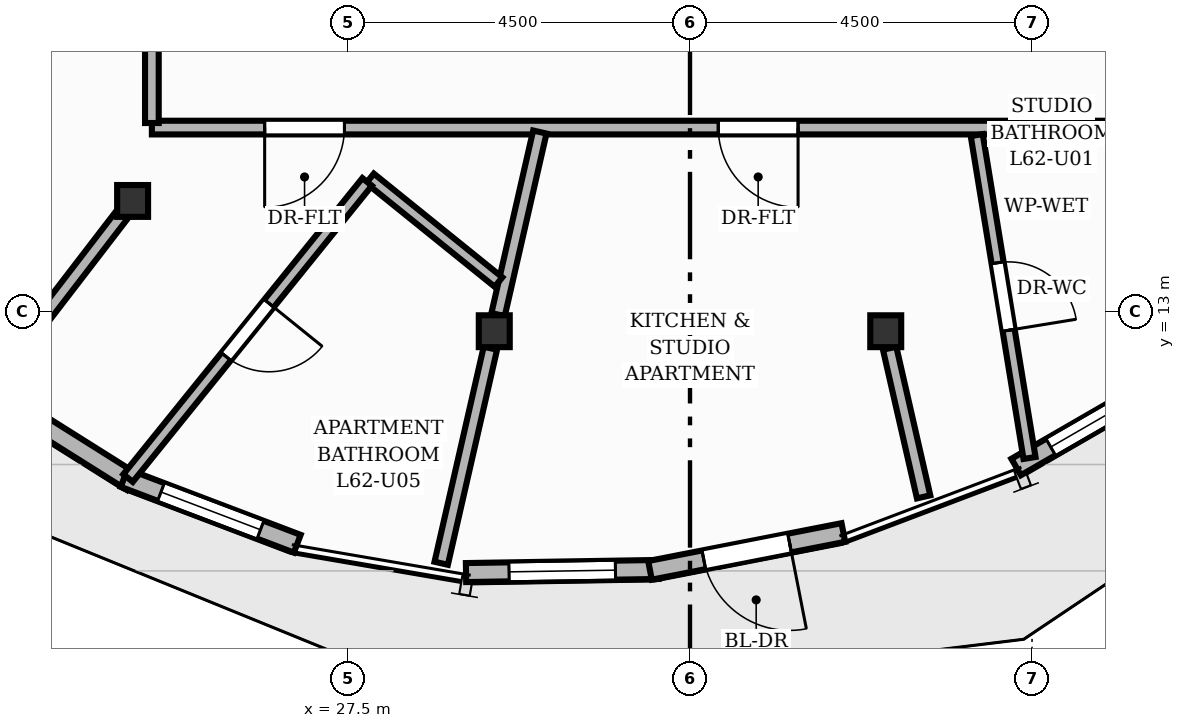
"""IFC4 building model, lengths in metres.
Left out: names, types, materials, properties, quantities, classifications, styles, units other than length and angle.
Written with IfcOpenShell. Run it as: python <this file> out.ifc"""

import sys

from ifc_helpers import new_model, si_unit, direction, frame, frame_2d, origin, origin_2d, place, context, subcontext, project, spatial, rectangle, i_section, extrude, element, fill, save


model = new_model("IFC4")
c1 = context("Model", 3, precision=1e-05, world=origin(), true_north=direction((0.0, 1.0)))
c2 = subcontext(c1, "Body", "Model", "MODEL_VIEW")
j1 = project(units=[si_unit("LENGTHUNIT", "METRE"), si_unit("PLANEANGLEUNIT", "RADIAN")], contexts=[c1])
p1 = place(None, origin())
s1 = spatial("IfcSite", under=j1, at=p1, CompositionType="ELEMENT")
p2 = place(p1, origin())
s2 = spatial("IfcBuilding", under=s1, at=p2, CompositionType="ELEMENT")
p3 = place(p2, frame((0.0, 0.0, 207.84)))
s3 = spatial("IfcBuildingStorey", under=s2, at=p3, CompositionType="ELEMENT", Elevation=207.84)
for number, where, z_axis, x_axis in (
    (1, (24.667, 14.455, 0.0), (0.0, 0.0, 1.0), (1.0, 0.0, 0.0)),
    (2, (29.425, 12.74, 0.0), (0.0, 0.0, 1.0), (1.0, 0.0, 0.0)),
    (3, (34.575, 12.74, 0.0), (0.0, 0.0, 1.0), (1.0, 0.0, 0.0)),
):
    element("IfcColumn", number, at=place(p3, frame(where, z_axis=z_axis, x_axis=x_axis)), inside=s3, PredefinedType="COLUMN", context=c2, shape_type="SweptSolid", body=[
        extrude(i_section(OverallWidth=0.407, OverallDepth=0.419, WebThickness=0.031, FlangeThickness=0.049, at=origin_2d()), origin(), (0.0, 0.0, 1.0), 3.2),
    ])
p4 = place(p3, frame((24.657, 10.758, 0.0), z_axis=(0.0, 0.0, 1.0), x_axis=(-0.846426943671, 0.532504862914, 0.0)))
e4 = element("IfcWall", 4, at=p4, inside=s3, PredefinedType="SOLIDWALL", context=c2, shape_type="SweptSolid", body=[
    extrude(rectangle(XDim=2.415, YDim=0.25, at=frame_2d((1.208, 0.0))), origin(), (0.0, 0.0, 1.0), 2.96),
])
p5 = place(p3, frame((26.833, 9.945, 0.0), z_axis=(0.0, 0.0, 1.0), x_axis=(-0.934909280934, 0.354886793813, 0.0)))
e5 = element("IfcWall", 5, at=p5, inside=s3, PredefinedType="SOLIDWALL", context=c2, shape_type="SweptSolid", body=[
    extrude(rectangle(XDim=2.437, YDim=0.25, at=frame_2d((1.218, 0.0))), origin(), (0.0, 0.0, 1.0), 2.96),
])
p6 = place(p5, frame((0.518, 0.0, 0.85)))
e6 = element("IfcOpeningElement", 6, at=p6, cuts=e5, PredefinedType="OPENING", context=c2, shape_type="SweptSolid", body=[
    extrude(rectangle(XDim=1.4, YDim=1.55, at=frame_2d((0.7, 0.775))), frame((0.0, 0.135, 0.0), z_axis=(0.0, -1.0, 0.0), x_axis=(1.0, 0.0, 0.0)), (0.0, 0.0, 1.0), 0.27),
])
p7 = place(p3, frame((31.585, 9.606, 0.0), z_axis=(0.0, 0.0, 1.0), x_axis=(-0.999868796453, -0.016198453019, 0.0)))
e7 = element("IfcWall", 7, at=p7, inside=s3, PredefinedType="SOLIDWALL", context=c2, shape_type="SweptSolid", body=[
    extrude(rectangle(XDim=2.532, YDim=0.25, at=frame_2d((1.266, 0.0))), origin(), (0.0, 0.0, 1.0), 2.96),
])
p8 = place(p7, frame((0.566, 0.0, 0.85)))
e8 = element("IfcOpeningElement", 8, at=p8, cuts=e7, PredefinedType="OPENING", context=c2, shape_type="SweptSolid", body=[
    extrude(rectangle(XDim=1.4, YDim=1.55, at=frame_2d((0.7, 0.775))), frame((0.0, 0.135, 0.0), z_axis=(0.0, -1.0, 0.0), x_axis=(1.0, 0.0, 0.0)), (0.0, 0.0, 1.0), 0.27),
])
p9 = place(p3, frame((34.018, 10.092, 0.0), z_axis=(0.0, 0.0, 1.0), x_axis=(-0.981387252987, -0.1920392139, 0.0)))
e9 = element("IfcWall", 9, at=p9, inside=s3, PredefinedType="SOLIDWALL", context=c2, shape_type="SweptSolid", body=[
    extrude(rectangle(XDim=2.592, YDim=0.25, at=frame_2d((1.296, 0.0))), origin(), (0.0, 0.0, 1.0), 2.96),
])
p10 = place(p9, frame((0.721, 0.0, 0.0)))
e10 = element("IfcOpeningElement", 10, at=p10, cuts=e9, PredefinedType="OPENING", context=c2, shape_type="SweptSolid", body=[
    extrude(rectangle(XDim=1.15, YDim=2.2, at=frame_2d((0.575, 1.1))), frame((0.0, 0.135, 0.0), z_axis=(0.0, -1.0, 0.0), x_axis=(1.0, 0.0, 0.0)), (0.0, 0.0, 1.0), 0.27),
])
p11 = place(p3, frame((38.63, 12.305, 0.0), z_axis=(0.0, 0.0, 1.0), x_axis=(-0.865914653104, -0.500191776762, 0.0)))
e11 = element("IfcWall", 11, at=p11, inside=s3, PredefinedType="SOLIDWALL", context=c2, shape_type="SweptSolid", body=[
    extrude(rectangle(XDim=2.702, YDim=0.25, at=frame_2d((1.351, 0.0))), origin(), (0.0, 0.0, 1.0), 2.96),
])
p12 = place(p11, frame((0.526, 0.0, 0.85)))
e12 = element("IfcOpeningElement", 12, at=p12, cuts=e11, PredefinedType="OPENING", context=c2, shape_type="SweptSolid", body=[
    extrude(rectangle(XDim=1.65, YDim=1.55, at=frame_2d((0.825, 0.775))), frame((0.0, 0.135, 0.0), z_axis=(0.0, -1.0, 0.0), x_axis=(1.0, 0.0, 0.0)), (0.0, 0.0, 1.0), 0.27),
])
p13 = place(p3, frame((24.527, 14.273, 0.0), z_axis=(0.0, 0.0, 1.0), x_axis=(-0.609211911664, -0.793007469502, 0.0)))
e13 = element("IfcWall", 13, at=p13, inside=s3, PredefinedType="PARTITIONING", context=c2, shape_type="SweptSolid", body=[
    extrude(rectangle(XDim=2.863, YDim=0.18, at=frame_2d((1.431, 0.0))), origin(), (0.0, 0.0, 1.0), 2.403),
])
p14 = place(p3, frame((29.374, 12.517, 0.0), z_axis=(0.0, 0.0, 1.0), x_axis=(-0.22289331625, -0.974842843525, 0.0)))
e14 = element("IfcWall", 14, at=p14, inside=s3, PredefinedType="PARTITIONING", context=c2, shape_type="SweptSolid", body=[
    extrude(rectangle(XDim=2.903, YDim=0.18, at=frame_2d((1.451, 0.0))), origin(), (0.0, 0.0, 1.0), 2.403),
])
p15 = place(p3, frame((34.626, 12.517, 0.0), z_axis=(0.0, 0.0, 1.0), x_axis=(0.222930532859, -0.974834333371, 0.0)))
e15 = element("IfcWall", 15, at=p15, inside=s3, PredefinedType="PARTITIONING", context=c2, shape_type="SweptSolid", body=[
    extrude(rectangle(XDim=2.006, YDim=0.18, at=frame_2d((1.003, 0.0))), origin(), (0.0, 0.0, 1.0), 2.403),
])
p16 = place(p3, frame((39.08, 15.42, 0.0), z_axis=(0.0, 0.0, 1.0), x_axis=(-1.0, 0.0, 0.0)))
e16 = element("IfcWall", 16, at=p16, inside=s3, PredefinedType="PARTITIONING", context=c2, shape_type="SweptSolid", body=[
    extrude(rectangle(XDim=14.16, YDim=0.18, at=frame_2d((7.08, 0.0))), origin(), (0.0, 0.0, 1.0), 2.955),
])
p17 = place(p16, frame((5.658, 0.0, 0.0)))
e17 = element("IfcOpeningElement", 17, at=p17, cuts=e16, PredefinedType="OPENING", context=c2, shape_type="SweptSolid", body=[
    extrude(rectangle(XDim=1.05, YDim=2.15, at=frame_2d((0.525, 1.075))), frame((0.0, 0.1, 0.0), z_axis=(0.0, -1.0, 0.0), x_axis=(1.0, 0.0, 0.0)), (0.0, 0.0, 1.0), 0.2),
])
p18 = place(p16, frame((11.626, 0.0, 0.0)))
e18 = element("IfcOpeningElement", 18, at=p18, cuts=e16, PredefinedType="OPENING", context=c2, shape_type="SweptSolid", body=[
    extrude(rectangle(XDim=1.05, YDim=2.15, at=frame_2d((0.525, 1.075))), frame((0.0, 0.1, 0.0), z_axis=(0.0, -1.0, 0.0), x_axis=(1.0, 0.0, 0.0)), (0.0, 0.0, 1.0), 0.2),
])
p19 = place(p3, frame((24.92, 15.48, 0.0), z_axis=(0.0, 0.0, 1.0), x_axis=(0.0, 1.0, 0.0)))
e19 = element("IfcWall", 19, at=p19, inside=s3, PredefinedType="PARTITIONING", context=c2, shape_type="SweptSolid", body=[
    extrude(rectangle(XDim=5.136, YDim=0.18, at=frame_2d((2.568, 0.0))), origin(), (0.0, 0.0, 1.0), 2.955),
])
p20 = place(p3, frame((35.772, 15.321, 0.0), z_axis=(0.0, 0.0, 1.0), x_axis=(0.16134496112, -0.986898071495, 0.0)))
e20 = element("IfcWall", 20, at=p20, inside=s3, PredefinedType="PLUMBINGWALL", context=c2, shape_type="SweptSolid", body=[
    extrude(rectangle(XDim=4.305, YDim=0.16, at=frame_2d((2.152, 0.0))), origin(), (0.0, 0.0, 1.0), 2.692),
])
p21 = place(p20, frame((1.702, 0.0, 0.0)))
e21 = element("IfcOpeningElement", 21, at=p21, cuts=e20, PredefinedType="OPENING", context=c2, shape_type="SweptSolid", body=[
    extrude(rectangle(XDim=0.9, YDim=2.1, at=frame_2d((0.45, 1.05))), frame((0.0, 0.09, 0.0), z_axis=(0.0, -1.0, 0.0), x_axis=(1.0, 0.0, 0.0)), (0.0, 0.0, 1.0), 0.18),
])
p22 = place(p3, frame((29.475, 12.959, 0.0), z_axis=(0.0, 0.0, 1.0), x_axis=(0.222927030412, 0.974835134323, 0.0)))
e22 = element("IfcWall", 22, at=p22, inside=s3, PredefinedType="PARTITIONING", context=c2, shape_type="SweptSolid", body=[
    extrude(rectangle(XDim=2.464, YDim=0.18, at=frame_2d((1.232, 0.0))), origin(), (0.0, 0.0, 1.0), 2.403),
])
p23 = place(p3, frame((29.48, 13.387, 0.0), z_axis=(0.0, 0.0, 1.0), x_axis=(-0.778120709533, 0.628114767695, 0.0)))
e23 = element("IfcWall", 23, at=p23, inside=s3, PredefinedType="PLUMBINGWALL", context=c2, shape_type="SweptSolid", body=[
    extrude(rectangle(XDim=2.173, YDim=0.16, at=frame_2d((1.086, 0.0))), origin(), (0.0, 0.0, 1.0), 2.955),
])
p24 = place(p3, frame((27.752, 14.705, 0.0), z_axis=(0.0, 0.0, 1.0), x_axis=(-0.628089704981, -0.778140939996, 0.0)))
e24 = element("IfcWall", 24, at=p24, inside=s3, PredefinedType="PLUMBINGWALL", context=c2, shape_type="SweptSolid", body=[
    extrude(rectangle(XDim=5.008, YDim=0.16, at=frame_2d((2.504, 0.0))), origin(), (0.0, 0.0, 1.0), 2.955),
])
p25 = place(p24, frame((2.054, 0.0, 0.0)))
e25 = element("IfcOpeningElement", 25, at=p25, cuts=e24, PredefinedType="OPENING", context=c2, shape_type="SweptSolid", body=[
    extrude(rectangle(XDim=0.9, YDim=2.1, at=frame_2d((0.45, 1.05))), frame((0.0, 0.09, 0.0), z_axis=(0.0, -1.0, 0.0), x_axis=(1.0, 0.0, 0.0)), (0.0, 0.0, 1.0), 0.18),
])
p26 = place(p10, origin())
e26 = element("IfcDoor", 26, at=p26, inside=s3, OperationType="SINGLE_SWING_LEFT", PredefinedType="DOOR", context=c2, shape_type="SweptSolid", body=[
    extrude(rectangle(XDim=1.15, YDim=2.2, at=frame_2d((0.575, 1.1))), frame((0.0, 0.025, 0.0), z_axis=(0.0, -1.0, 0.0), x_axis=(1.0, 0.0, 0.0)), (0.0, 0.0, 1.0), 0.05),
])
fill(e10, e26)
p27 = place(p6, origin())
e27 = element("IfcWindow", 27, at=p27, inside=s3, PartitioningType="SINGLE_PANEL", PredefinedType="WINDOW", context=c2, shape_type="SweptSolid", body=[
    extrude(rectangle(XDim=1.4, YDim=1.55, at=frame_2d((0.7, 0.775))), frame((0.0, 0.03, 0.0), z_axis=(0.0, -1.0, 0.0), x_axis=(1.0, 0.0, 0.0)), (0.0, 0.0, 1.0), 0.06),
])
fill(e6, e27)
p28 = place(p8, origin())
e28 = element("IfcWindow", 28, at=p28, inside=s3, PartitioningType="SINGLE_PANEL", PredefinedType="WINDOW", context=c2, shape_type="SweptSolid", body=[
    extrude(rectangle(XDim=1.4, YDim=1.55, at=frame_2d((0.7, 0.775))), frame((0.0, 0.03, 0.0), z_axis=(0.0, -1.0, 0.0), x_axis=(1.0, 0.0, 0.0)), (0.0, 0.0, 1.0), 0.06),
])
fill(e8, e28)
p29 = place(p12, origin())
e29 = element("IfcWindow", 29, at=p29, inside=s3, PartitioningType="SINGLE_PANEL", PredefinedType="WINDOW", context=c2, shape_type="SweptSolid", body=[
    extrude(rectangle(XDim=1.65, YDim=1.55, at=frame_2d((0.825, 0.775))), frame((0.0, 0.03, 0.0), z_axis=(0.0, -1.0, 0.0), x_axis=(1.0, 0.0, 0.0)), (0.0, 0.0, 1.0), 0.06),
])
fill(e12, e29)
p30 = place(p17, origin())
e30 = element("IfcDoor", 30, at=p30, inside=s3, OperationType="SINGLE_SWING_LEFT", PredefinedType="DOOR", context=c2, shape_type="SweptSolid", body=[
    extrude(rectangle(XDim=1.05, YDim=2.15, at=frame_2d((0.525, 1.075))), frame((0.0, 0.025, 0.0), z_axis=(0.0, -1.0, 0.0), x_axis=(1.0, 0.0, 0.0)), (0.0, 0.0, 1.0), 0.05),
])
fill(e17, e30)
p31 = place(p21, origin())
e31 = element("IfcDoor", 31, at=p31, inside=s3, OperationType="SINGLE_SWING_RIGHT", PredefinedType="DOOR", context=c2, shape_type="SweptSolid", body=[
    extrude(rectangle(XDim=0.9, YDim=2.1, at=frame_2d((0.45, 1.05))), frame((0.0, 0.025, 0.0), z_axis=(0.0, -1.0, 0.0), x_axis=(1.0, 0.0, 0.0)), (0.0, 0.0, 1.0), 0.05),
])
fill(e21, e31)
p32 = place(p18, origin())
e32 = element("IfcDoor", 32, at=p32, inside=s3, OperationType="SINGLE_SWING_RIGHT", PredefinedType="DOOR", context=c2, shape_type="SweptSolid", body=[
    extrude(rectangle(XDim=1.05, YDim=2.15, at=frame_2d((0.525, 1.075))), frame((0.0, 0.025, 0.0), z_axis=(0.0, -1.0, 0.0), x_axis=(1.0, 0.0, 0.0)), (0.0, 0.0, 1.0), 0.05),
])
fill(e18, e32)
p33 = place(p25, origin())
e33 = element("IfcDoor", 33, at=p33, inside=s3, OperationType="SINGLE_SWING_LEFT", PredefinedType="DOOR", context=c2, shape_type="SweptSolid", body=[
    extrude(rectangle(XDim=0.9, YDim=2.1, at=frame_2d((0.45, 1.05))), frame((0.0, 0.025, 0.0), z_axis=(0.0, -1.0, 0.0), x_axis=(1.0, 0.0, 0.0)), (0.0, 0.0, 1.0), 0.05),
])
fill(e25, e33)
save(model, sys.argv[1])
